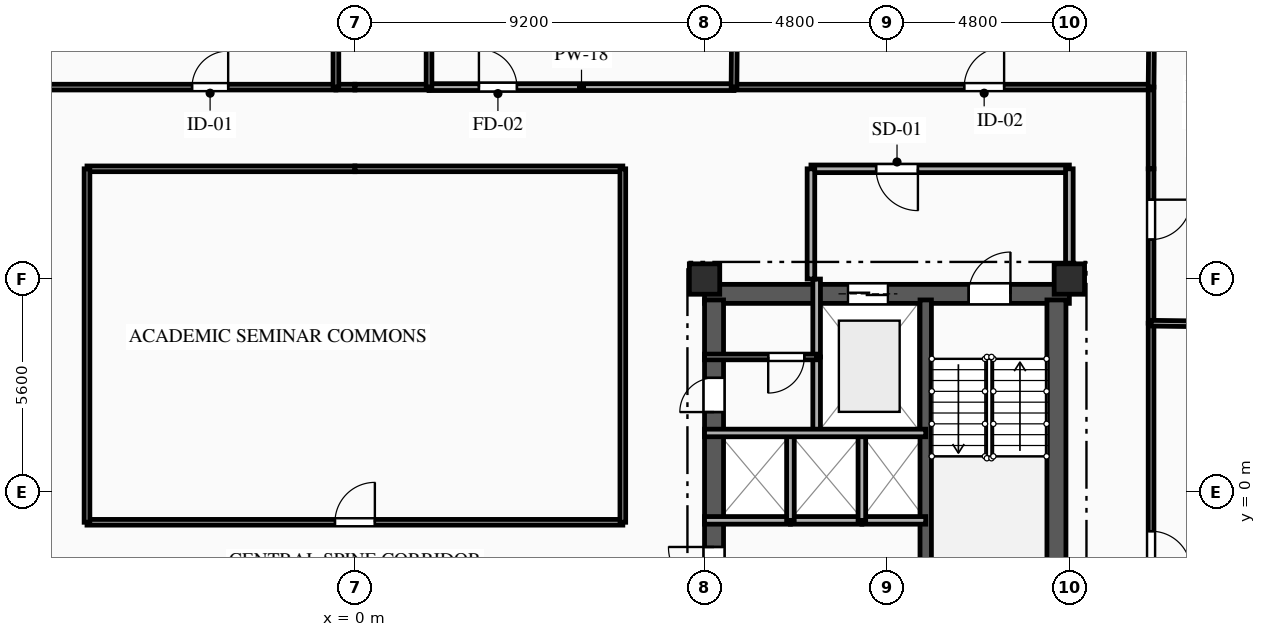
"""IFC4 building model, lengths in metres.
Left out: names, types, materials, properties, quantities, classifications, styles, units other than length and angle.
Written with IfcOpenShell. Run it as: python <this file> out.ifc"""

import sys

from ifc_helpers import new_model, si_unit, direction, frame, frame_2d, origin, origin_2d, place, context, subcontext, project, spatial, rectangle, extrude, element, fill, save


model = new_model("IFC4")
c1 = context("Model", 3, precision=1e-05, world=origin(), true_north=direction((0.0, 1.0)))
c2 = subcontext(c1, "Body", "Model", "MODEL_VIEW")
j1 = project(units=[si_unit("LENGTHUNIT", "METRE"), si_unit("PLANEANGLEUNIT", "RADIAN")], contexts=[c1])
p1 = place(None, origin())
s1 = spatial("IfcSite", under=j1, at=p1, CompositionType="ELEMENT")
p2 = place(p1, origin())
s2 = spatial("IfcBuilding", under=s1, at=p2, CompositionType="ELEMENT")
p3 = place(p2, frame((0.0, 0.0, 193.05)))
s3 = spatial("IfcBuildingStorey", under=s2, at=p3, CompositionType="ELEMENT", Elevation=193.05)
for number, where, z_axis, x_axis in (
    (1, (9.2, 5.6, 0.0), (0.0, 0.0, 1.0), (1.0, 0.0, 0.0)),
    (2, (18.8, 5.6, 0.0), (0.0, 0.0, 1.0), (1.0, 0.0, 0.0)),
):
    element("IfcColumn", number, at=place(p3, frame(where, z_axis=z_axis, x_axis=x_axis)), inside=s3, PredefinedType="COLUMN", context=c2, shape_type="SweptSolid", body=[
        extrude(rectangle(XDim=0.8, YDim=0.8, at=origin_2d()), origin(), (0.0, 0.0, 1.0), 3.35),
    ])
p4 = place(p3, frame((9.2, 5.21, 0.0), z_axis=(0.0, 0.0, 1.0), x_axis=(1.0, 0.0, 0.0)))
e3 = element("IfcWall", 3, at=p4, inside=s3, PredefinedType="SHEAR", context=c2, shape_type="SweptSolid", body=[
    extrude(rectangle(XDim=9.6, YDim=0.5, at=frame_2d((4.8, 0.0))), origin(), (0.0, 0.0, 1.0), 3.04),
])
p5 = place(p4, frame((6.95, 0.0, 0.0)))
e4 = element("IfcOpeningElement", 4, at=p5, cuts=e3, PredefinedType="OPENING", context=c2, shape_type="SweptSolid", body=[
    extrude(rectangle(XDim=1.1, YDim=2.15, at=frame_2d((0.55, 1.075))), frame((0.0, 0.26, 0.0), z_axis=(0.0, -1.0, 0.0), x_axis=(1.0, 0.0, 0.0)), (0.0, 0.0, 1.0), 0.52),
])
p6 = place(p4, frame((3.775, 0.0, 0.0)))
e5 = element("IfcOpeningElement", 5, at=p6, cuts=e3, PredefinedType="OPENING", context=c2, shape_type="SweptSolid", body=[
    extrude(rectangle(XDim=1.05, YDim=2.1, at=frame_2d((0.525, 1.05))), frame((0.0, 0.26, 0.0), z_axis=(0.0, -1.0, 0.0), x_axis=(1.0, 0.0, 0.0)), (0.0, 0.0, 1.0), 0.52),
])
p7 = place(p3, frame((9.45, -5.05, 0.0), z_axis=(0.0, 0.0, 1.0), x_axis=(0.0, 1.0, 0.0)))
e6 = element("IfcWall", 6, at=p7, inside=s3, PredefinedType="SHEAR", context=c2, shape_type="SweptSolid", body=[
    extrude(rectangle(XDim=10.1, YDim=0.5, at=frame_2d((5.05, 0.0))), origin(), (0.0, 0.0, 1.0), 3.04),
])
p8 = place(p7, frame((7.15, 0.0, 0.0)))
e7 = element("IfcOpeningElement", 7, at=p8, cuts=e6, PredefinedType="OPENING", context=c2, shape_type="SweptSolid", body=[
    extrude(rectangle(XDim=0.9, YDim=2.1, at=frame_2d((0.45, 1.05))), frame((0.0, 0.26, 0.0), z_axis=(0.0, -1.0, 0.0), x_axis=(1.0, 0.0, 0.0)), (0.0, 0.0, 1.0), 0.52),
])
p9 = place(p7, frame((2.4, 0.0, 0.0)))
e8 = element("IfcOpeningElement", 8, at=p9, cuts=e6, PredefinedType="OPENING", context=c2, shape_type="SweptSolid", body=[
    extrude(rectangle(XDim=1.2, YDim=2.15, at=frame_2d((0.6, 1.075))), frame((0.0, 0.26, 0.0), z_axis=(0.0, -1.0, 0.0), x_axis=(1.0, 0.0, 0.0)), (0.0, 0.0, 1.0), 0.52),
])
p10 = place(p3, frame((18.46, -5.05, 0.0), z_axis=(0.0, 0.0, 1.0), x_axis=(0.0, 1.0, 0.0)))
e9 = element("IfcWall", 9, at=p10, inside=s3, PredefinedType="SHEAR", context=c2, shape_type="SweptSolid", body=[
    extrude(rectangle(XDim=10.1, YDim=0.5, at=frame_2d((5.05, 0.0))), origin(), (0.0, 0.0, 1.0), 3.04),
])
p11 = place(p3, frame((15.02, -5.05, 0.0), z_axis=(0.0, 0.0, 1.0), x_axis=(0.0, 1.0, 0.0)))
e10 = element("IfcWall", 10, at=p11, inside=s3, PredefinedType="SHEAR", context=c2, shape_type="SweptSolid", body=[
    extrude(rectangle(XDim=10.1, YDim=0.3, at=frame_2d((5.05, 0.0))), origin(), (0.0, 0.0, 1.0), 3.04),
])
p12 = place(p3, frame((12.15, 3.55, 0.0), z_axis=(0.0, 0.0, 1.0), x_axis=(0.0, -1.0, 0.0)))
e11 = element("IfcWall", 11, at=p12, inside=s3, PredefinedType="PARTITIONING", context=c2, shape_type="SweptSolid", body=[
    extrude(rectangle(XDim=2.0, YDim=0.2, at=frame_2d((1.0, 0.0))), origin(), (0.0, 0.0, 1.0), 3.04),
])
p13 = place(p3, frame((12.15, 5.6, 0.0), z_axis=(0.0, 0.0, 1.0), x_axis=(0.0, -1.0, 0.0)))
e12 = element("IfcWall", 12, at=p13, inside=s3, PredefinedType="PARTITIONING", context=c2, shape_type="SweptSolid", body=[
    extrude(rectangle(XDim=2.05, YDim=0.2, at=frame_2d((1.025, 0.0))), origin(), (0.0, 0.0, 1.0), 3.04),
])
p14 = place(p3, frame((18.8, 8.5, 0.0), z_axis=(0.0, 0.0, 1.0), x_axis=(-1.0, 0.0, 0.0)))
e13 = element("IfcWall", 13, at=p14, inside=s3, PredefinedType="PARTITIONING", context=c2, shape_type="SweptSolid", body=[
    extrude(rectangle(XDim=6.8, YDim=0.2, at=frame_2d((3.4, 0.0))), origin(), (0.0, 0.0, 1.0), 3.04),
])
p15 = place(p14, frame((3.985, 0.0, 0.0)))
e14 = element("IfcOpeningElement", 14, at=p15, cuts=e13, PredefinedType="OPENING", context=c2, shape_type="SweptSolid", body=[
    extrude(rectangle(XDim=1.1, YDim=2.15, at=frame_2d((0.55, 1.075))), frame((0.0, 0.11, 0.0), z_axis=(0.0, -1.0, 0.0), x_axis=(1.0, 0.0, 0.0)), (0.0, 0.0, 1.0), 0.22),
])
p16 = place(p3, frame((18.8, 5.6, 0.0), z_axis=(0.0, 0.0, 1.0), x_axis=(0.0, 1.0, 0.0)))
e15 = element("IfcWall", 15, at=p16, inside=s3, PredefinedType="PARTITIONING", context=c2, shape_type="SweptSolid", body=[
    extrude(rectangle(XDim=2.9, YDim=0.2, at=frame_2d((1.45, 0.0))), origin(), (0.0, 0.0, 1.0), 2.665),
])
p17 = place(p3, frame((12.0, 8.5, 0.0), z_axis=(0.0, 0.0, 1.0), x_axis=(0.0, -1.0, 0.0)))
e16 = element("IfcWall", 16, at=p17, inside=s3, PredefinedType="PARTITIONING", context=c2, shape_type="SweptSolid", body=[
    extrude(rectangle(XDim=2.9, YDim=0.2, at=frame_2d((1.45, 0.0))), origin(), (0.0, 0.0, 1.0), 3.04),
])
p18 = place(p3, frame((12.15, 3.55, 0.0), z_axis=(0.0, 0.0, 1.0), x_axis=(-1.0, 0.0, 0.0)))
e17 = element("IfcWall", 17, at=p18, inside=s3, PredefinedType="PARTITIONING", context=c2, shape_type="SweptSolid", body=[
    extrude(rectangle(XDim=2.95, YDim=0.15, at=frame_2d((1.475, 0.0))), origin(), (0.0, 0.0, 1.0), 3.04),
])
p19 = place(p18, frame((0.325, 0.0, 0.0)))
e18 = element("IfcOpeningElement", 18, at=p19, cuts=e17, PredefinedType="OPENING", context=c2, shape_type="SweptSolid", body=[
    extrude(rectangle(XDim=0.95, YDim=2.1, at=frame_2d((0.475, 1.05))), frame((0.0, 0.085, 0.0), z_axis=(0.0, -1.0, 0.0), x_axis=(1.0, 0.0, 0.0)), (0.0, 0.0, 1.0), 0.17),
])
p20 = place(p3, frame((11.46, -0.75, 0.0), z_axis=(0.0, 0.0, 1.0), x_axis=(-1.0, 0.0, 0.0)))
e19 = element("IfcWall", 19, at=p20, inside=s3, PredefinedType="PARTITIONING", context=c2, shape_type="SweptSolid", body=[
    extrude(rectangle(XDim=2.26, YDim=0.2, at=frame_2d((1.13, 0.0))), origin(), (0.0, 0.0, 1.0), 3.04),
])
p21 = place(p3, frame((13.34, -0.75, 0.0), z_axis=(0.0, 0.0, 1.0), x_axis=(-1.0, 0.0, 0.0)))
e20 = element("IfcWall", 20, at=p21, inside=s3, PredefinedType="PARTITIONING", context=c2, shape_type="SweptSolid", body=[
    extrude(rectangle(XDim=1.88, YDim=0.2, at=frame_2d((0.94, 0.0))), origin(), (0.0, 0.0, 1.0), 3.04),
])
p22 = place(p3, frame((15.02, -0.75, 0.0), z_axis=(0.0, 0.0, 1.0), x_axis=(-1.0, 0.0, 0.0)))
e21 = element("IfcWall", 21, at=p22, inside=s3, PredefinedType="PARTITIONING", context=c2, shape_type="SweptSolid", body=[
    extrude(rectangle(XDim=1.68, YDim=0.2, at=frame_2d((0.84, 0.0))), origin(), (0.0, 0.0, 1.0), 3.04),
])
for number, where, z_axis, x_axis in (
    (22, (11.46, -0.75, 0.0), (0.0, 0.0, 1.0), (0.0, 1.0, 0.0)),
    (23, (13.34, -0.75, 0.0), (0.0, 0.0, 1.0), (0.0, 1.0, 0.0)),
):
    element("IfcWall", number, at=place(p3, frame(where, z_axis=z_axis, x_axis=x_axis)), inside=s3, PredefinedType="PARTITIONING", context=c2, shape_type="SweptSolid", body=[
        extrude(rectangle(XDim=2.3, YDim=0.2, at=frame_2d((1.15, 0.0))), origin(), (0.0, 0.0, 1.0), 3.04),
    ])
p23 = place(p3, frame((-8.625, 10.65, 0.0), z_axis=(0.0, 0.0, 1.0), x_axis=(1.0, 0.0, 0.0)))
e24 = element("IfcWall", 24, at=p23, inside=s3, PredefinedType="PARTITIONING", context=c2, shape_type="SweptSolid", body=[
    extrude(rectangle(XDim=8.125, YDim=0.15, at=frame_2d((4.062, 0.0))), origin(), (0.0, 0.0, 1.0), 3.04),
])
p24 = place(p23, frame((4.339, 0.0, 0.0)))
e25 = element("IfcOpeningElement", 25, at=p24, cuts=e24, PredefinedType="OPENING", context=c2, shape_type="SweptSolid", body=[
    extrude(rectangle(XDim=0.95, YDim=2.1, at=frame_2d((0.475, 1.05))), frame((0.0, 0.085, 0.0), z_axis=(0.0, -1.0, 0.0), x_axis=(1.0, 0.0, 0.0)), (0.0, 0.0, 1.0), 0.17),
])
p25 = place(p3, frame((-0.5, 10.65, 0.0), z_axis=(0.0, 0.0, 1.0), x_axis=(1.0, 0.0, 0.0)))
e26 = element("IfcWall", 26, at=p25, inside=s3, PredefinedType="PLUMBINGWALL", context=c2, shape_type="SweptSolid", body=[
    extrude(rectangle(XDim=0.5, YDim=0.15, at=frame_2d((0.25, 0.0))), origin(), (0.0, 0.0, 1.0), 3.04),
])
p26 = place(p3, frame((0.0, 8.5, 0.0), z_axis=(0.0, 0.0, 1.0), x_axis=(-1.0, 0.0, 0.0)))
e27 = element("IfcWall", 27, at=p26, inside=s3, PredefinedType="PARTITIONING", context=c2, shape_type="SweptSolid", body=[
    extrude(rectangle(XDim=7.05, YDim=0.15, at=frame_2d((3.525, 0.0))), origin(), (0.0, 0.0, 1.0), 3.04),
])
p27 = place(p3, frame((20.95, 10.65, 0.0), z_axis=(0.0, 0.0, 1.0), x_axis=(0.0, -1.0, 0.0)))
e28 = element("IfcWall", 28, at=p27, inside=s3, PredefinedType="PARTITIONING", context=c2, shape_type="SweptSolid", body=[
    extrude(rectangle(XDim=2.15, YDim=0.15, at=frame_2d((1.075, 0.0))), origin(), (0.0, 0.0, 1.0), 3.04),
])
p28 = place(p3, frame((1.95, 10.65, 0.0), z_axis=(0.0, 0.0, 1.0), x_axis=(1.0, 0.0, 0.0)))
e29 = element("IfcWall", 29, at=p28, inside=s3, PredefinedType="PARTITIONING", context=c2, shape_type="SweptSolid", body=[
    extrude(rectangle(XDim=8.025, YDim=0.18, at=frame_2d((4.013, 0.0))), origin(), (0.0, 0.0, 1.0), 3.04),
])
p29 = place(p28, frame((1.313, 0.0, 0.0)))
e30 = element("IfcOpeningElement", 30, at=p29, cuts=e29, PredefinedType="OPENING", context=c2, shape_type="SweptSolid", body=[
    extrude(rectangle(XDim=1.0, YDim=2.15, at=frame_2d((0.5, 1.075))), frame((0.0, 0.1, 0.0), z_axis=(0.0, -1.0, 0.0), x_axis=(1.0, 0.0, 0.0)), (0.0, 0.0, 1.0), 0.2),
])
p30 = place(p3, frame((0.0, 10.65, 0.0), z_axis=(0.0, 0.0, 1.0), x_axis=(1.0, 0.0, 0.0)))
e31 = element("IfcWall", 31, at=p30, inside=s3, PredefinedType="PLUMBINGWALL", context=c2, shape_type="SweptSolid", body=[
    extrude(rectangle(XDim=1.95, YDim=0.15, at=frame_2d((0.975, 0.0))), origin(), (0.0, 0.0, 1.0), 3.04),
])
p31 = place(p3, frame((9.975, 10.65, 0.0), z_axis=(0.0, 0.0, 1.0), x_axis=(1.0, 0.0, 0.0)))
e32 = element("IfcWall", 32, at=p31, inside=s3, PredefinedType="PARTITIONING", context=c2, shape_type="SweptSolid", body=[
    extrude(rectangle(XDim=10.975, YDim=0.15, at=frame_2d((5.487, 0.0))), origin(), (0.0, 0.0, 1.0), 3.04),
])
p32 = place(p31, frame((6.058, 0.0, 0.0)))
e33 = element("IfcOpeningElement", 33, at=p32, cuts=e32, PredefinedType="OPENING", context=c2, shape_type="SweptSolid", body=[
    extrude(rectangle(XDim=1.05, YDim=2.15, at=frame_2d((0.525, 1.075))), frame((0.0, 0.085, 0.0), z_axis=(0.0, -1.0, 0.0), x_axis=(1.0, 0.0, 0.0)), (0.0, 0.0, 1.0), 0.17),
])
p33 = place(p3, frame((7.05, 8.5, 0.0), z_axis=(0.0, 0.0, 1.0), x_axis=(-1.0, 0.0, 0.0)))
e34 = element("IfcWall", 34, at=p33, inside=s3, PredefinedType="PARTITIONING", context=c2, shape_type="SweptSolid", body=[
    extrude(rectangle(XDim=7.05, YDim=0.15, at=frame_2d((3.525, 0.0))), origin(), (0.0, 0.0, 1.0), 3.04),
])
p34 = place(p3, frame((20.95, 4.438, 0.0), z_axis=(0.0, 0.0, 1.0), x_axis=(0.0, -1.0, 0.0)))
e35 = element("IfcWall", 35, at=p34, inside=s3, PredefinedType="PARTITIONING", context=c2, shape_type="SweptSolid", body=[
    extrude(rectangle(XDim=10.038, YDim=0.15, at=frame_2d((5.019, 0.0))), origin(), (0.0, 0.0, 1.0), 2.695),
])
p35 = place(p34, frame((5.472, 0.0, 0.0)))
e36 = element("IfcOpeningElement", 36, at=p35, cuts=e35, PredefinedType="OPENING", context=c2, shape_type="SweptSolid", body=[
    extrude(rectangle(XDim=1.05, YDim=2.15, at=frame_2d((0.525, 1.075))), frame((0.0, 0.085, 0.0), z_axis=(0.0, -1.0, 0.0), x_axis=(1.0, 0.0, 0.0)), (0.0, 0.0, 1.0), 0.17),
])
p36 = place(p3, frame((20.95, 8.5, 0.0), z_axis=(0.0, 0.0, 1.0), x_axis=(0.0, -1.0, 0.0)))
e37 = element("IfcWall", 37, at=p36, inside=s3, PredefinedType="PARTITIONING", context=c2, shape_type="SweptSolid", body=[
    extrude(rectangle(XDim=4.062, YDim=0.15, at=frame_2d((2.031, 0.0))), origin(), (0.0, 0.0, 1.0), 3.04),
])
p37 = place(p36, frame((0.812, 0.0, 0.0)))
e38 = element("IfcOpeningElement", 38, at=p37, cuts=e37, PredefinedType="OPENING", context=c2, shape_type="SweptSolid", body=[
    extrude(rectangle(XDim=1.05, YDim=2.15, at=frame_2d((0.525, 1.075))), frame((0.0, 0.085, 0.0), z_axis=(0.0, -1.0, 0.0), x_axis=(1.0, 0.0, 0.0)), (0.0, 0.0, 1.0), 0.17),
])
p38 = place(p3, frame((-7.05, -0.8, 0.0), z_axis=(0.0, 0.0, 1.0), x_axis=(1.0, 0.0, 0.0)))
e39 = element("IfcWall", 39, at=p38, inside=s3, PredefinedType="PARTITIONING", context=c2, shape_type="SweptSolid", body=[
    extrude(rectangle(XDim=14.1, YDim=0.15, at=frame_2d((7.05, 0.0))), origin(), (0.0, 0.0, 1.0), 3.04),
])
p39 = place(p38, frame((6.525, 0.0, 0.0)))
e40 = element("IfcOpeningElement", 40, at=p39, cuts=e39, PredefinedType="OPENING", context=c2, shape_type="SweptSolid", body=[
    extrude(rectangle(XDim=1.05, YDim=2.15, at=frame_2d((0.525, 1.075))), frame((0.0, 0.085, 0.0), z_axis=(0.0, -1.0, 0.0), x_axis=(1.0, 0.0, 0.0)), (0.0, 0.0, 1.0), 0.17),
])
for number, where, z_axis, x_axis in (
    (41, (-7.05, 8.5, 0.0), (0.0, 0.0, 1.0), (0.0, -1.0, 0.0)),
    (42, (7.05, -0.8, 0.0), (0.0, 0.0, 1.0), (0.0, 1.0, 0.0)),
):
    element("IfcWall", number, at=place(p3, frame(where, z_axis=z_axis, x_axis=x_axis)), inside=s3, PredefinedType="PARTITIONING", context=c2, shape_type="SweptSolid", body=[
        extrude(rectangle(XDim=9.3, YDim=0.15, at=frame_2d((4.65, 0.0))), origin(), (0.0, 0.0, 1.0), 3.04),
    ])
p40 = place(p3, frame((20.95, 4.438, 0.0), z_axis=(0.0, 0.0, 1.0), x_axis=(0.999913116238, -0.013181804667, 0.0)))
e43 = element("IfcWall", 43, at=p40, inside=s3, PredefinedType="PARTITIONING", context=c2, shape_type="SweptSolid", body=[
    extrude(rectangle(XDim=3.334, YDim=0.15, at=frame_2d((1.667, 0.0))), origin(), (0.0, 0.0, 1.0), 3.04),
])
p41 = place(p3, frame((20.95, 10.65, 0.0), z_axis=(0.0, 0.0, 1.0), x_axis=(0.009535990233, 0.999954531411, 0.0)))
e44 = element("IfcWall", 44, at=p41, inside=s3, PredefinedType="PARTITIONING", context=c2, shape_type="SweptSolid", body=[
    extrude(rectangle(XDim=4.608, YDim=0.15, at=frame_2d((2.304, 0.0))), origin(), (0.0, 0.0, 1.0), 2.665),
])
for number, where, z_axis, x_axis in (
    (45, (-0.5, 12.8, 0.0), (0.0, 0.0, 1.0), (0.0, -1.0, 0.0)),
    (46, (1.95, 10.65, 0.0), (0.0, 0.0, 1.0), (0.0, 1.0, 0.0)),
):
    element("IfcWall", number, at=place(p3, frame(where, z_axis=z_axis, x_axis=x_axis)), inside=s3, PredefinedType="PLUMBINGWALL", context=c2, shape_type="SweptSolid", body=[
        extrude(rectangle(XDim=2.15, YDim=0.15, at=frame_2d((1.075, 0.0))), origin(), (0.0, 0.0, 1.0), 3.04),
    ])
p42 = place(p3, frame((10.019, 16.412, 0.0), z_axis=(0.0, 0.0, 1.0), x_axis=(-0.007584527603, -0.999971237057, 0.0)))
e47 = element("IfcWall", 47, at=p42, inside=s3, PredefinedType="PARTITIONING", context=c2, shape_type="SweptSolid", body=[
    extrude(rectangle(XDim=5.762, YDim=0.15, at=frame_2d((2.881, 0.0))), origin(), (0.0, 0.0, 1.0), 3.04),
])
p43 = place(p3, frame((9.2, 1.55, 0.0), z_axis=(0.0, 0.0, 1.0), x_axis=(1.0, 0.0, 0.0)))
e48 = element("IfcWall", 48, at=p43, inside=s3, PredefinedType="PARTITIONING", context=c2, shape_type="SweptSolid", body=[
    extrude(rectangle(XDim=5.82, YDim=0.2, at=frame_2d((2.91, 0.0))), origin(), (0.0, 0.0, 1.0), 3.04),
])
p44 = place(p5, origin())
e49 = element("IfcDoor", 49, at=p44, inside=s3, OperationType="SINGLE_SWING_RIGHT", PredefinedType="DOOR", context=c2, shape_type="SweptSolid", body=[
    extrude(rectangle(XDim=1.1, YDim=2.15, at=frame_2d((0.55, 1.075))), frame((0.0, 0.025, 0.0), z_axis=(0.0, -1.0, 0.0), x_axis=(1.0, 0.0, 0.0)), (0.0, 0.0, 1.0), 0.05),
])
fill(e4, e49)
p45 = place(p6, origin())
e50 = element("IfcDoor", 50, at=p45, inside=s3, OperationType="DOUBLE_DOOR_SLIDING", PredefinedType="DOOR", context=c2, shape_type="SweptSolid", body=[
    extrude(rectangle(XDim=1.05, YDim=2.1, at=frame_2d((0.525, 1.05))), frame((0.0, 0.025, 0.0), z_axis=(0.0, -1.0, 0.0), x_axis=(1.0, 0.0, 0.0)), (0.0, 0.0, 1.0), 0.05),
])
fill(e5, e50)
p46 = place(p15, origin())
e51 = element("IfcDoor", 51, at=p46, inside=s3, OperationType="SINGLE_SWING_LEFT", PredefinedType="DOOR", context=c2, shape_type="SweptSolid", body=[
    extrude(rectangle(XDim=1.1, YDim=2.15, at=frame_2d((0.55, 1.075))), frame((0.0, 0.025, 0.0), z_axis=(0.0, -1.0, 0.0), x_axis=(1.0, 0.0, 0.0)), (0.0, 0.0, 1.0), 0.05),
])
fill(e14, e51)
p47 = place(p19, origin())
e52 = element("IfcDoor", 52, at=p47, inside=s3, OperationType="SINGLE_SWING_RIGHT", PredefinedType="DOOR", context=c2, shape_type="SweptSolid", body=[
    extrude(rectangle(XDim=0.95, YDim=2.1, at=frame_2d((0.475, 1.05))), frame((0.0, 0.025, 0.0), z_axis=(0.0, -1.0, 0.0), x_axis=(1.0, 0.0, 0.0)), (0.0, 0.0, 1.0), 0.05),
])
fill(e18, e52)
p48 = place(p8, origin())
e53 = element("IfcDoor", 53, at=p48, inside=s3, OperationType="SINGLE_SWING_LEFT", PredefinedType="DOOR", context=c2, shape_type="SweptSolid", body=[
    extrude(rectangle(XDim=0.9, YDim=2.1, at=frame_2d((0.45, 1.05))), frame((0.0, 0.025, 0.0), z_axis=(0.0, -1.0, 0.0), x_axis=(1.0, 0.0, 0.0)), (0.0, 0.0, 1.0), 0.05),
])
fill(e7, e53)
p49 = place(p9, origin())
e54 = element("IfcDoor", 54, at=p49, inside=s3, OperationType="SINGLE_SWING_RIGHT", PredefinedType="DOOR", context=c2, shape_type="SweptSolid", body=[
    extrude(rectangle(XDim=1.2, YDim=2.15, at=frame_2d((0.6, 1.075))), frame((0.0, 0.025, 0.0), z_axis=(0.0, -1.0, 0.0), x_axis=(1.0, 0.0, 0.0)), (0.0, 0.0, 1.0), 0.05),
])
fill(e8, e54)
p50 = place(p24, origin())
e55 = element("IfcDoor", 55, at=p50, inside=s3, OperationType="SINGLE_SWING_RIGHT", PredefinedType="DOOR", context=c2, shape_type="SweptSolid", body=[
    extrude(rectangle(XDim=0.95, YDim=2.1, at=frame_2d((0.475, 1.05))), frame((0.0, 0.025, 0.0), z_axis=(0.0, -1.0, 0.0), x_axis=(1.0, 0.0, 0.0)), (0.0, 0.0, 1.0), 0.05),
])
fill(e25, e55)
p51 = place(p29, origin())
e56 = element("IfcDoor", 56, at=p51, inside=s3, OperationType="SINGLE_SWING_LEFT", PredefinedType="DOOR", context=c2, shape_type="SweptSolid", body=[
    extrude(rectangle(XDim=1.0, YDim=2.15, at=frame_2d((0.5, 1.075))), frame((0.0, 0.025, 0.0), z_axis=(0.0, -1.0, 0.0), x_axis=(1.0, 0.0, 0.0)), (0.0, 0.0, 1.0), 0.05),
])
fill(e30, e56)
p52 = place(p32, origin())
e57 = element("IfcDoor", 57, at=p52, inside=s3, OperationType="SINGLE_SWING_RIGHT", PredefinedType="DOOR", context=c2, shape_type="SweptSolid", body=[
    extrude(rectangle(XDim=1.05, YDim=2.15, at=frame_2d((0.525, 1.075))), frame((0.0, 0.025, 0.0), z_axis=(0.0, -1.0, 0.0), x_axis=(1.0, 0.0, 0.0)), (0.0, 0.0, 1.0), 0.05),
])
fill(e33, e57)
p53 = place(p35, origin())
e58 = element("IfcDoor", 58, at=p53, inside=s3, OperationType="SINGLE_SWING_RIGHT", PredefinedType="DOOR", context=c2, shape_type="SweptSolid", body=[
    extrude(rectangle(XDim=1.05, YDim=2.15, at=frame_2d((0.525, 1.075))), frame((0.0, 0.025, 0.0), z_axis=(0.0, -1.0, 0.0), x_axis=(1.0, 0.0, 0.0)), (0.0, 0.0, 1.0), 0.05),
])
fill(e36, e58)
p54 = place(p37, origin())
e59 = element("IfcDoor", 59, at=p54, inside=s3, OperationType="SINGLE_SWING_LEFT", PredefinedType="DOOR", context=c2, shape_type="SweptSolid", body=[
    extrude(rectangle(XDim=1.05, YDim=2.15, at=frame_2d((0.525, 1.075))), frame((0.0, 0.025, 0.0), z_axis=(0.0, -1.0, 0.0), x_axis=(1.0, 0.0, 0.0)), (0.0, 0.0, 1.0), 0.05),
])
fill(e38, e59)
p55 = place(p39, origin())
e60 = element("IfcDoor", 60, at=p55, inside=s3, OperationType="SINGLE_SWING_RIGHT", PredefinedType="DOOR", context=c2, shape_type="SweptSolid", body=[
    extrude(rectangle(XDim=1.05, YDim=2.15, at=frame_2d((0.525, 1.075))), frame((0.0, 0.025, 0.0), z_axis=(0.0, -1.0, 0.0), x_axis=(1.0, 0.0, 0.0)), (0.0, 0.0, 1.0), 0.05),
])
fill(e40, e60)
save(model, sys.argv[1])
